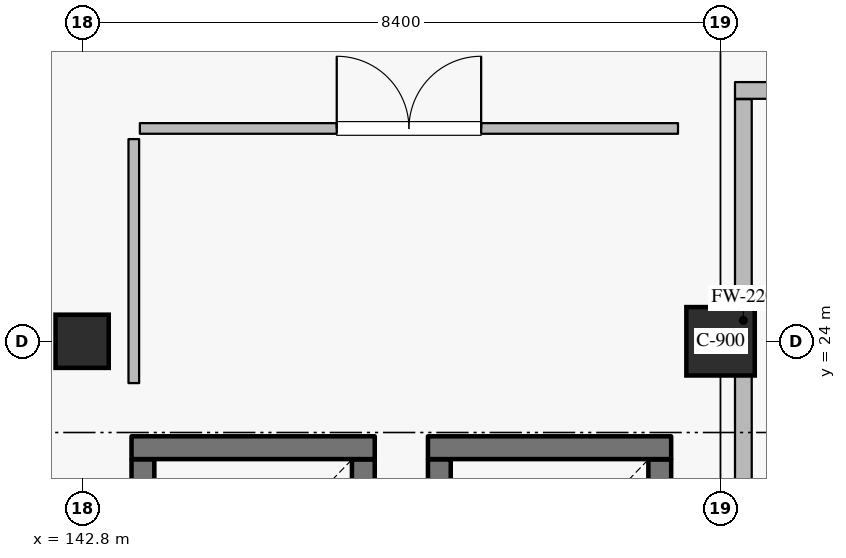
"""IFC4 building model, lengths in metres.
Left out: names, types, materials, properties, quantities, classifications, styles, units other than length and angle.
Written with IfcOpenShell. Run it as: python <this file> out.ifc"""

import sys

from ifc_helpers import new_model, si_unit, direction, frame, frame_2d, origin, origin_2d, place, context, subcontext, project, spatial, rectangle, extrude, element, fill, save


model = new_model("IFC4")
c1 = context("Model", 3, precision=1e-05, world=origin(), true_north=direction((0.0, 1.0)))
c2 = subcontext(c1, "Body", "Model", "MODEL_VIEW")
j1 = project(units=[si_unit("LENGTHUNIT", "METRE"), si_unit("PLANEANGLEUNIT", "RADIAN")], contexts=[c1])
p1 = place(None, origin())
s1 = spatial("IfcSite", under=j1, at=p1, CompositionType="ELEMENT")
p2 = place(p1, origin())
s2 = spatial("IfcBuilding", under=s1, at=p2, CompositionType="ELEMENT")
p3 = place(p2, frame((0.0, 0.0, 25.2)))
s3 = spatial("IfcBuildingStorey", under=s2, at=p3, CompositionType="ELEMENT", Elevation=25.2)
p4 = place(p3, frame((151.2, 24.0, 0.0), z_axis=(0.0, 0.0, 1.0), x_axis=(1.0, 0.0, 0.0)))
e1 = element("IfcColumn", 1, at=p4, inside=s3, PredefinedType="COLUMN", context=c2, shape_type="SweptSolid", body=[
    extrude(rectangle(XDim=0.9, YDim=0.9, at=origin_2d()), origin(), (0.0, 0.0, 1.0), 3.6),
])
p5 = place(p3, frame((142.8, 24.0, 0.0), z_axis=(0.0, 0.0, 1.0), x_axis=(1.0, 0.0, 0.0)))
e2 = element("IfcColumn", 2, at=p5, inside=s3, PredefinedType="COLUMN", context=c2, shape_type="SweptSolid", body=[
    extrude(rectangle(XDim=0.7, YDim=0.7, at=origin_2d()), origin(), (0.0, 0.0, 1.0), 3.6),
])
p6 = place(p3, frame((146.5, 19.755, 0.0), z_axis=(0.0, 0.0, 1.0), x_axis=(0.0, 1.0, 0.0)))
e3 = element("IfcWall", 3, at=p6, inside=s3, PredefinedType="SHEAR", context=c2, shape_type="SweptSolid", body=[
    extrude(rectangle(XDim=2.69, YDim=0.3, at=frame_2d((1.345, 0.0))), origin(), (0.0, 0.0, 1.0), 3.335),
])
p7 = place(p3, frame((146.65, 22.6, 0.0), z_axis=(0.0, 0.0, 1.0), x_axis=(-1.0, 0.0, 0.0)))
e4 = element("IfcWall", 4, at=p7, inside=s3, PredefinedType="SHEAR", context=c2, shape_type="SweptSolid", body=[
    extrude(rectangle(XDim=3.2, YDim=0.3, at=frame_2d((1.6, 0.0))), origin(), (0.0, 0.0, 1.0), 3.335),
])
for number, where, z_axis, x_axis in (
    (5, (143.6, 22.445, 0.0), (0.0, 0.0, 1.0), (0.0, -1.0, 0.0)),
    (6, (150.4, 19.755, 0.0), (0.0, 0.0, 1.0), (0.0, 1.0, 0.0)),
):
    element("IfcWall", number, at=place(p3, frame(where, z_axis=z_axis, x_axis=x_axis)), inside=s3, PredefinedType="SHEAR", context=c2, shape_type="SweptSolid", body=[
        extrude(rectangle(XDim=2.69, YDim=0.3, at=frame_2d((1.345, 0.0))), origin(), (0.0, 0.0, 1.0), 3.335),
    ])
p8 = place(p3, frame((150.55, 22.6, 0.0), z_axis=(0.0, 0.0, 1.0), x_axis=(-1.0, 0.0, 0.0)))
e7 = element("IfcWall", 7, at=p8, inside=s3, PredefinedType="SHEAR", context=c2, shape_type="SweptSolid", body=[
    extrude(rectangle(XDim=3.2, YDim=0.3, at=frame_2d((1.6, 0.0))), origin(), (0.0, 0.0, 1.0), 3.335),
])
p9 = place(p3, frame((147.5, 22.445, 0.0), z_axis=(0.0, 0.0, 1.0), x_axis=(0.0, -1.0, 0.0)))
e8 = element("IfcWall", 8, at=p9, inside=s3, PredefinedType="SHEAR", context=c2, shape_type="SweptSolid", body=[
    extrude(rectangle(XDim=2.69, YDim=0.3, at=frame_2d((1.345, 0.0))), origin(), (0.0, 0.0, 1.0), 3.335),
])
p10 = place(p3, frame((151.5, 21.365, 0.0), z_axis=(0.0, 0.0, 1.0), x_axis=(0.0, 1.0, 0.0)))
e9 = element("IfcWall", 9, at=p10, inside=s3, PredefinedType="PARTITIONING", context=c2, shape_type="SweptSolid", body=[
    extrude(rectangle(XDim=5.82, YDim=0.22, at=frame_2d((2.91, 0.0))), origin(), (0.0, 0.0, 1.0), 3.335),
])
p11 = place(p3, frame((151.39, 27.3, 0.0), z_axis=(0.0, 0.0, 1.0), x_axis=(1.0, 0.0, 0.0)))
e10 = element("IfcWall", 10, at=p11, inside=s3, PredefinedType="PARTITIONING", context=c2, shape_type="SweptSolid", body=[
    extrude(rectangle(XDim=3.82, YDim=0.22, at=frame_2d((1.91, 0.0))), origin(), (0.0, 0.0, 1.0), 3.335),
])
p12 = place(p11, frame((1.35, 0.0, 0.0)))
e11 = element("IfcOpeningElement", 11, at=p12, cuts=e10, PredefinedType="OPENING", context=c2, shape_type="SweptSolid", body=[
    extrude(rectangle(XDim=1.12, YDim=2.2, at=frame_2d((0.56, 1.1))), frame((0.0, 0.12, 0.0), z_axis=(0.0, -1.0, 0.0), x_axis=(1.0, 0.0, 0.0)), (0.0, 0.0, 1.0), 0.24),
])
p13 = place(p3, frame((143.56, 26.8, 0.0), z_axis=(0.0, 0.0, 1.0), x_axis=(1.0, 0.0, 0.0)))
e12 = element("IfcWall", 12, at=p13, inside=s3, PredefinedType="PARTITIONING", context=c2, shape_type="SweptSolid", body=[
    extrude(rectangle(XDim=7.08, YDim=0.14, at=frame_2d((3.54, 0.0))), origin(), (0.0, 0.0, 1.0), 3.335),
])
p14 = place(p13, frame((2.59, 0.0, 0.0)))
e13 = element("IfcOpeningElement", 13, at=p14, cuts=e12, PredefinedType="OPENING", context=c2, shape_type="SweptSolid", body=[
    extrude(rectangle(XDim=1.9, YDim=2.4, at=frame_2d((0.95, 1.2))), frame((0.0, 0.08, 0.0), z_axis=(0.0, -1.0, 0.0), x_axis=(1.0, 0.0, 0.0)), (0.0, 0.0, 1.0), 0.16),
])
p15 = place(p3, frame((143.48, 23.45, 0.0), z_axis=(0.0, 0.0, 1.0), x_axis=(0.0, 1.0, 0.0)))
e14 = element("IfcWall", 14, at=p15, inside=s3, PredefinedType="PARTITIONING", context=c2, shape_type="SweptSolid", body=[
    extrude(rectangle(XDim=3.21, YDim=0.14, at=frame_2d((1.605, 0.0))), origin(), (0.0, 0.0, 1.0), 3.335),
])
p16 = place(p14, origin())
e15 = element("IfcDoor", 15, at=p16, inside=s3, OperationType="DOUBLE_DOOR_SINGLE_SWING", PredefinedType="DOOR", context=c2, shape_type="SweptSolid", body=[
    extrude(rectangle(XDim=1.9, YDim=2.4, at=frame_2d((0.95, 1.2))), frame((0.0, 0.025, 0.0), z_axis=(0.0, -1.0, 0.0), x_axis=(1.0, 0.0, 0.0)), (0.0, 0.0, 1.0), 0.05),
])
fill(e13, e15)
save(model, sys.argv[1])
